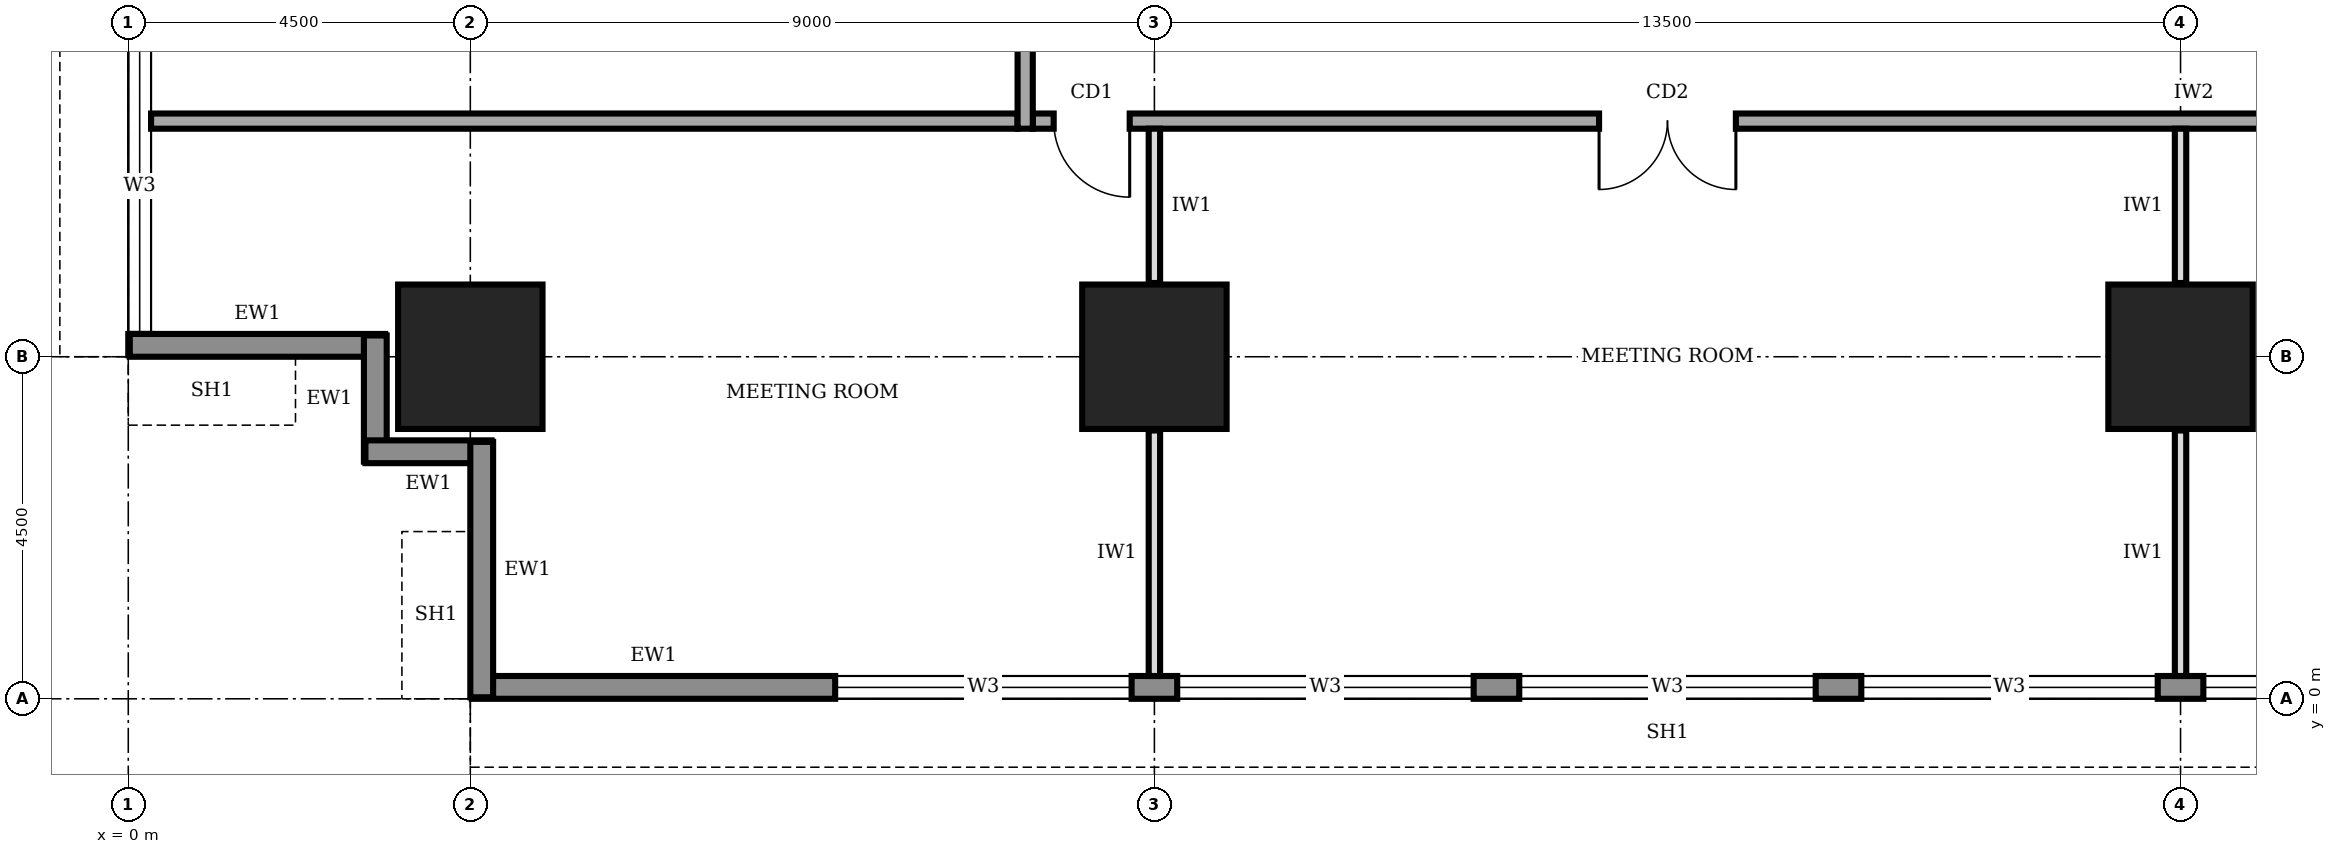
"""IFC4 building model, lengths in metres.
Left out: names, types, materials, properties, quantities, classifications, styles, units other than length and angle.
Written with IfcOpenShell. Run it as: python <this file> out.ifc"""

import sys

from ifc_helpers import new_model, si_unit, direction, frame, frame_2d, origin, origin_2d, place, context, subcontext, project, spatial, rectangle, extrude, element, fill, save


model = new_model("IFC4")
c1 = context("Model", 3, precision=1e-05, world=origin(), true_north=direction((0.0, 1.0)))
c2 = subcontext(c1, "Body", "Model", "MODEL_VIEW")
j1 = project(units=[si_unit("LENGTHUNIT", "METRE"), si_unit("PLANEANGLEUNIT", "RADIAN")], contexts=[c1])
p1 = place(None, origin())
s1 = spatial("IfcSite", under=j1, at=p1, CompositionType="ELEMENT")
p2 = place(p1, origin())
s2 = spatial("IfcBuilding", under=s1, at=p2, CompositionType="ELEMENT")
p3 = place(p2, frame((0.0, 0.0, 93.0)))
s3 = spatial("IfcBuildingStorey", under=s2, at=p3, CompositionType="ELEMENT", Elevation=93.0)
for number, where, z_axis, x_axis in (
    (1, (4.5, 4.5, 0.0), (0.0, 0.0, 1.0), (1.0, 0.0, 0.0)),
    (2, (13.5, 4.5, 0.0), (0.0, 0.0, 1.0), (1.0, 0.0, 0.0)),
    (3, (27.0, 4.5, 0.0), (0.0, 0.0, 1.0), (1.0, 0.0, 0.0)),
):
    element("IfcColumn", number, at=place(p3, frame(where, z_axis=z_axis, x_axis=x_axis)), inside=s3, PredefinedType="COLUMN", context=c2, shape_type="SweptSolid", body=[
        extrude(rectangle(XDim=1.9, YDim=1.9, at=origin_2d()), origin(), (0.0, 0.0, 1.0), 4.0),
    ])
p4 = place(p3, frame((4.52, 0.15, 0.0), z_axis=(0.0, 0.0, 1.0), x_axis=(1.0, 0.0, 0.0)))
e4 = element("IfcWall", 4, at=p4, inside=s3, PredefinedType="STANDARD", context=c2, shape_type="SweptSolid", body=[
    extrude(rectangle(XDim=31.46, YDim=0.3, at=frame_2d((15.73, 0.0))), origin(), (0.0, 0.0, 1.0), 3.75),
])
p5 = place(p4, frame((4.78, 0.0, 0.95)))
e5 = element("IfcOpeningElement", 5, at=p5, cuts=e4, PredefinedType="OPENING", context=c2, shape_type="SweptSolid", body=[
    extrude(rectangle(XDim=3.9, YDim=1.8, at=frame_2d((1.95, 0.9))), frame((0.0, 0.16, 0.0), z_axis=(0.0, -1.0, 0.0), x_axis=(1.0, 0.0, 0.0)), (0.0, 0.0, 1.0), 0.32),
])
p6 = place(p4, frame((9.28, 0.0, 0.95)))
e6 = element("IfcOpeningElement", 6, at=p6, cuts=e4, PredefinedType="OPENING", context=c2, shape_type="SweptSolid", body=[
    extrude(rectangle(XDim=3.9, YDim=1.8, at=frame_2d((1.95, 0.9))), frame((0.0, 0.16, 0.0), z_axis=(0.0, -1.0, 0.0), x_axis=(1.0, 0.0, 0.0)), (0.0, 0.0, 1.0), 0.32),
])
p7 = place(p4, frame((13.78, 0.0, 0.95)))
e7 = element("IfcOpeningElement", 7, at=p7, cuts=e4, PredefinedType="OPENING", context=c2, shape_type="SweptSolid", body=[
    extrude(rectangle(XDim=3.9, YDim=1.8, at=frame_2d((1.95, 0.9))), frame((0.0, 0.16, 0.0), z_axis=(0.0, -1.0, 0.0), x_axis=(1.0, 0.0, 0.0)), (0.0, 0.0, 1.0), 0.32),
])
p8 = place(p4, frame((18.28, 0.0, 0.95)))
e8 = element("IfcOpeningElement", 8, at=p8, cuts=e4, PredefinedType="OPENING", context=c2, shape_type="SweptSolid", body=[
    extrude(rectangle(XDim=3.9, YDim=1.8, at=frame_2d((1.95, 0.9))), frame((0.0, 0.16, 0.0), z_axis=(0.0, -1.0, 0.0), x_axis=(1.0, 0.0, 0.0)), (0.0, 0.0, 1.0), 0.32),
])
p9 = place(p4, frame((22.78, 0.0, 0.95)))
e9 = element("IfcOpeningElement", 9, at=p9, cuts=e4, PredefinedType="OPENING", context=c2, shape_type="SweptSolid", body=[
    extrude(rectangle(XDim=3.9, YDim=1.8, at=frame_2d((1.95, 0.9))), frame((0.0, 0.16, 0.0), z_axis=(0.0, -1.0, 0.0), x_axis=(1.0, 0.0, 0.0)), (0.0, 0.0, 1.0), 0.32),
])
p10 = place(p4, frame((27.28, 0.0, 0.95)))
e10 = element("IfcOpeningElement", 10, at=p10, cuts=e4, PredefinedType="OPENING", context=c2, shape_type="SweptSolid", body=[
    extrude(rectangle(XDim=3.9, YDim=1.8, at=frame_2d((1.95, 0.9))), frame((0.0, 0.16, 0.0), z_axis=(0.0, -1.0, 0.0), x_axis=(1.0, 0.0, 0.0)), (0.0, 0.0, 1.0), 0.32),
])
p11 = place(p3, frame((0.15, 35.98, 0.0), z_axis=(0.0, 0.0, 1.0), x_axis=(0.0, -1.0, 0.0)))
e11 = element("IfcWall", 11, at=p11, inside=s3, PredefinedType="STANDARD", context=c2, shape_type="SweptSolid", body=[
    extrude(rectangle(XDim=31.46, YDim=0.3, at=frame_2d((15.73, 0.0))), origin(), (0.0, 0.0, 1.0), 3.75),
])
p12 = place(p11, frame((27.28, 0.0, 0.95)))
e12 = element("IfcOpeningElement", 12, at=p12, cuts=e11, PredefinedType="OPENING", context=c2, shape_type="SweptSolid", body=[
    extrude(rectangle(XDim=3.9, YDim=1.8, at=frame_2d((1.95, 0.9))), frame((0.0, 0.16, 0.0), z_axis=(0.0, -1.0, 0.0), x_axis=(1.0, 0.0, 0.0)), (0.0, 0.0, 1.0), 0.32),
])
p13 = place(p11, frame((22.78, 0.0, 0.95)))
e13 = element("IfcOpeningElement", 13, at=p13, cuts=e11, PredefinedType="OPENING", context=c2, shape_type="SweptSolid", body=[
    extrude(rectangle(XDim=3.9, YDim=1.8, at=frame_2d((1.95, 0.9))), frame((0.0, 0.16, 0.0), z_axis=(0.0, -1.0, 0.0), x_axis=(1.0, 0.0, 0.0)), (0.0, 0.0, 1.0), 0.32),
])
p14 = place(p11, frame((18.28, 0.0, 0.95)))
e14 = element("IfcOpeningElement", 14, at=p14, cuts=e11, PredefinedType="OPENING", context=c2, shape_type="SweptSolid", body=[
    extrude(rectangle(XDim=3.9, YDim=1.8, at=frame_2d((1.95, 0.9))), frame((0.0, 0.16, 0.0), z_axis=(0.0, -1.0, 0.0), x_axis=(1.0, 0.0, 0.0)), (0.0, 0.0, 1.0), 0.32),
])
p15 = place(p11, frame((13.78, 0.0, 0.95)))
e15 = element("IfcOpeningElement", 15, at=p15, cuts=e11, PredefinedType="OPENING", context=c2, shape_type="SweptSolid", body=[
    extrude(rectangle(XDim=3.9, YDim=1.8, at=frame_2d((1.95, 0.9))), frame((0.0, 0.16, 0.0), z_axis=(0.0, -1.0, 0.0), x_axis=(1.0, 0.0, 0.0)), (0.0, 0.0, 1.0), 0.32),
])
p16 = place(p11, frame((9.28, 0.0, 0.95)))
e16 = element("IfcOpeningElement", 16, at=p16, cuts=e11, PredefinedType="OPENING", context=c2, shape_type="SweptSolid", body=[
    extrude(rectangle(XDim=3.9, YDim=1.8, at=frame_2d((1.95, 0.9))), frame((0.0, 0.16, 0.0), z_axis=(0.0, -1.0, 0.0), x_axis=(1.0, 0.0, 0.0)), (0.0, 0.0, 1.0), 0.32),
])
p17 = place(p11, frame((4.78, 0.0, 0.95)))
e17 = element("IfcOpeningElement", 17, at=p17, cuts=e11, PredefinedType="OPENING", context=c2, shape_type="SweptSolid", body=[
    extrude(rectangle(XDim=3.9, YDim=1.8, at=frame_2d((1.95, 0.9))), frame((0.0, 0.16, 0.0), z_axis=(0.0, -1.0, 0.0), x_axis=(1.0, 0.0, 0.0)), (0.0, 0.0, 1.0), 0.32),
])
p18 = place(p3, frame((0.02, 4.65, 0.0), z_axis=(0.0, 0.0, 1.0), x_axis=(1.0, 0.0, 0.0)))
e18 = element("IfcWall", 18, at=p18, inside=s3, PredefinedType="STANDARD", context=c2, shape_type="SweptSolid", body=[
    extrude(rectangle(XDim=3.36, YDim=0.3, at=frame_2d((1.68, 0.0))), origin(), (0.0, 0.0, 1.0), 2.85),
])
for number, where, z_axis, x_axis in (
    (19, (3.25, 4.78, 0.0), (0.0, 0.0, 1.0), (0.0, -1.0, 0.0)),
    (20, (3.12, 3.25, 0.0), (0.0, 0.0, 1.0), (1.0, 0.0, 0.0)),
):
    element("IfcWall", number, at=place(p3, frame(where, z_axis=z_axis, x_axis=x_axis)), inside=s3, PredefinedType="STANDARD", context=c2, shape_type="SweptSolid", body=[
        extrude(rectangle(XDim=1.66, YDim=0.3, at=frame_2d((0.83, 0.0))), origin(), (0.0, 0.0, 1.0), 3.75),
    ])
p19 = place(p3, frame((4.65, 3.38, 0.0), z_axis=(0.0, 0.0, 1.0), x_axis=(0.0, -1.0, 0.0)))
e21 = element("IfcWall", 21, at=p19, inside=s3, PredefinedType="STANDARD", context=c2, shape_type="SweptSolid", body=[
    extrude(rectangle(XDim=3.36, YDim=0.3, at=frame_2d((1.68, 0.0))), origin(), (0.0, 0.0, 1.0), 2.85),
])
p20 = place(p3, frame((11.9, 7.6, 0.0), z_axis=(0.0, 0.0, 1.0), x_axis=(1.0, 0.0, 0.0)))
e22 = element("IfcWall", 22, at=p20, inside=s3, PredefinedType="SOLIDWALL", context=c2, shape_type="SweptSolid", body=[
    extrude(rectangle(XDim=28.3, YDim=0.2, at=frame_2d((14.15, 0.0))), origin(), (0.0, 0.0, 1.0), 3.75),
])
p21 = place(p20, frame((0.275, 0.0, 0.0)))
e23 = element("IfcOpeningElement", 23, at=p21, cuts=e22, PredefinedType="OPENING", context=c2, shape_type="SweptSolid", body=[
    extrude(rectangle(XDim=1.0, YDim=2.1, at=frame_2d((0.5, 1.05))), frame((0.0, 0.11, 0.0), z_axis=(0.0, -1.0, 0.0), x_axis=(1.0, 0.0, 0.0)), (0.0, 0.0, 1.0), 0.22),
])
p22 = place(p20, frame((7.45, 0.0, 0.0)))
e24 = element("IfcOpeningElement", 24, at=p22, cuts=e22, PredefinedType="OPENING", context=c2, shape_type="SweptSolid", body=[
    extrude(rectangle(XDim=1.8, YDim=2.1, at=frame_2d((0.9, 1.05))), frame((0.0, 0.11, 0.0), z_axis=(0.0, -1.0, 0.0), x_axis=(1.0, 0.0, 0.0)), (0.0, 0.0, 1.0), 0.22),
])
p23 = place(p20, frame((21.3, 0.0, 0.0)))
e25 = element("IfcOpeningElement", 25, at=p23, cuts=e22, PredefinedType="OPENING", context=c2, shape_type="SweptSolid", body=[
    extrude(rectangle(XDim=1.0, YDim=2.1, at=frame_2d((0.5, 1.05))), frame((0.0, 0.11, 0.0), z_axis=(0.0, -1.0, 0.0), x_axis=(1.0, 0.0, 0.0)), (0.0, 0.0, 1.0), 0.22),
])
p24 = place(p3, frame((11.8, 32.8, 0.0), z_axis=(0.0, 0.0, 1.0), x_axis=(0.0, -1.0, 0.0)))
e26 = element("IfcWall", 26, at=p24, inside=s3, PredefinedType="SOLIDWALL", context=c2, shape_type="SweptSolid", body=[
    extrude(rectangle(XDim=25.3, YDim=0.2, at=frame_2d((12.65, 0.0))), origin(), (0.0, 0.0, 1.0), 3.75),
])
p25 = place(p24, frame((21.8, 0.0, 0.0)))
e27 = element("IfcOpeningElement", 27, at=p25, cuts=e26, PredefinedType="OPENING", context=c2, shape_type="SweptSolid", body=[
    extrude(rectangle(XDim=1.0, YDim=2.1, at=frame_2d((0.5, 1.05))), frame((0.0, 0.11, 0.0), z_axis=(0.0, -1.0, 0.0), x_axis=(1.0, 0.0, 0.0)), (0.0, 0.0, 1.0), 0.22),
])
p26 = place(p24, frame((17.7, 0.0, 0.0)))
e28 = element("IfcOpeningElement", 28, at=p26, cuts=e26, PredefinedType="OPENING", context=c2, shape_type="SweptSolid", body=[
    extrude(rectangle(XDim=1.0, YDim=2.1, at=frame_2d((0.5, 1.05))), frame((0.0, 0.11, 0.0), z_axis=(0.0, -1.0, 0.0), x_axis=(1.0, 0.0, 0.0)), (0.0, 0.0, 1.0), 0.22),
])
p27 = place(p24, frame((14.7, 0.0, 0.0)))
e29 = element("IfcOpeningElement", 29, at=p27, cuts=e26, PredefinedType="OPENING", context=c2, shape_type="SweptSolid", body=[
    extrude(rectangle(XDim=0.9, YDim=2.1, at=frame_2d((0.45, 1.05))), frame((0.0, 0.11, 0.0), z_axis=(0.0, -1.0, 0.0), x_axis=(1.0, 0.0, 0.0)), (0.0, 0.0, 1.0), 0.22),
])
p28 = place(p24, frame((11.65, 0.0, 0.0)))
e30 = element("IfcOpeningElement", 30, at=p28, cuts=e26, PredefinedType="OPENING", context=c2, shape_type="SweptSolid", body=[
    extrude(rectangle(XDim=0.9, YDim=2.1, at=frame_2d((0.45, 1.05))), frame((0.0, 0.11, 0.0), z_axis=(0.0, -1.0, 0.0), x_axis=(1.0, 0.0, 0.0)), (0.0, 0.0, 1.0), 0.22),
])
p29 = place(p24, frame((6.95, 0.0, 0.0)))
e31 = element("IfcOpeningElement", 31, at=p29, cuts=e26, PredefinedType="OPENING", context=c2, shape_type="SweptSolid", body=[
    extrude(rectangle(XDim=0.9, YDim=2.1, at=frame_2d((0.45, 1.05))), frame((0.0, 0.11, 0.0), z_axis=(0.0, -1.0, 0.0), x_axis=(1.0, 0.0, 0.0)), (0.0, 0.0, 1.0), 0.22),
])
p30 = place(p24, frame((9.5, 0.0, 0.0)))
e32 = element("IfcOpeningElement", 32, at=p30, cuts=e26, PredefinedType="OPENING", context=c2, shape_type="SweptSolid", body=[
    extrude(rectangle(XDim=1.0, YDim=2.1, at=frame_2d((0.5, 1.05))), frame((0.0, 0.11, 0.0), z_axis=(0.0, -1.0, 0.0), x_axis=(1.0, 0.0, 0.0)), (0.0, 0.0, 1.0), 0.22),
])
p31 = place(p24, frame((2.3, 0.0, 0.0)))
e33 = element("IfcOpeningElement", 33, at=p31, cuts=e26, PredefinedType="OPENING", context=c2, shape_type="SweptSolid", body=[
    extrude(rectangle(XDim=1.0, YDim=2.1, at=frame_2d((0.5, 1.05))), frame((0.0, 0.11, 0.0), z_axis=(0.0, -1.0, 0.0), x_axis=(1.0, 0.0, 0.0)), (0.0, 0.0, 1.0), 0.22),
])
p32 = place(p3, frame((0.3, 7.6, 0.0), z_axis=(0.0, 0.0, 1.0), x_axis=(1.0, 0.0, 0.0)))
e34 = element("IfcWall", 34, at=p32, inside=s3, PredefinedType="SOLIDWALL", context=c2, shape_type="SweptSolid", body=[
    extrude(rectangle(XDim=11.4, YDim=0.2, at=frame_2d((5.7, 0.0))), origin(), (0.0, 0.0, 1.0), 3.75),
])
p33 = place(p3, frame((13.5, 0.3, 0.0), z_axis=(0.0, 0.0, 1.0), x_axis=(0.0, 1.0, 0.0)))
e35 = element("IfcWall", 35, at=p33, inside=s3, PredefinedType="PARTITIONING", context=c2, shape_type="SweptSolid", body=[
    extrude(rectangle(XDim=3.23, YDim=0.15, at=frame_2d((1.615, 0.0))), origin(), (0.0, 0.0, 1.0), 2.85),
])
p34 = place(p3, frame((13.5, 5.47, 0.0), z_axis=(0.0, 0.0, 1.0), x_axis=(0.0, 1.0, 0.0)))
e36 = element("IfcWall", 36, at=p34, inside=s3, PredefinedType="PARTITIONING", context=c2, shape_type="SweptSolid", body=[
    extrude(rectangle(XDim=2.03, YDim=0.15, at=frame_2d((1.015, 0.0))), origin(), (0.0, 0.0, 1.0), 2.85),
])
p35 = place(p3, frame((27.0, 0.3, 0.0), z_axis=(0.0, 0.0, 1.0), x_axis=(0.0, 1.0, 0.0)))
e37 = element("IfcWall", 37, at=p35, inside=s3, PredefinedType="PARTITIONING", context=c2, shape_type="SweptSolid", body=[
    extrude(rectangle(XDim=3.23, YDim=0.15, at=frame_2d((1.615, 0.0))), origin(), (0.0, 0.0, 1.0), 2.85),
])
p36 = place(p3, frame((27.0, 5.47, 0.0), z_axis=(0.0, 0.0, 1.0), x_axis=(0.0, 1.0, 0.0)))
e38 = element("IfcWall", 38, at=p36, inside=s3, PredefinedType="PARTITIONING", context=c2, shape_type="SweptSolid", body=[
    extrude(rectangle(XDim=2.03, YDim=0.15, at=frame_2d((1.015, 0.0))), origin(), (0.0, 0.0, 1.0), 2.85),
])
p37 = place(p5, origin())
e39 = element("IfcWindow", 39, at=p37, inside=s3, PartitioningType="SINGLE_PANEL", PredefinedType="WINDOW", context=c2, shape_type="SweptSolid", body=[
    extrude(rectangle(XDim=3.9, YDim=1.8, at=frame_2d((1.95, 0.9))), frame((0.0, 0.03, 0.0), z_axis=(0.0, -1.0, 0.0), x_axis=(1.0, 0.0, 0.0)), (0.0, 0.0, 1.0), 0.06),
])
fill(e5, e39)
p38 = place(p6, origin())
e40 = element("IfcWindow", 40, at=p38, inside=s3, PartitioningType="SINGLE_PANEL", PredefinedType="WINDOW", context=c2, shape_type="SweptSolid", body=[
    extrude(rectangle(XDim=3.9, YDim=1.8, at=frame_2d((1.95, 0.9))), frame((0.0, 0.03, 0.0), z_axis=(0.0, -1.0, 0.0), x_axis=(1.0, 0.0, 0.0)), (0.0, 0.0, 1.0), 0.06),
])
fill(e6, e40)
p39 = place(p7, origin())
e41 = element("IfcWindow", 41, at=p39, inside=s3, PartitioningType="SINGLE_PANEL", PredefinedType="WINDOW", context=c2, shape_type="SweptSolid", body=[
    extrude(rectangle(XDim=3.9, YDim=1.8, at=frame_2d((1.95, 0.9))), frame((0.0, 0.03, 0.0), z_axis=(0.0, -1.0, 0.0), x_axis=(1.0, 0.0, 0.0)), (0.0, 0.0, 1.0), 0.06),
])
fill(e7, e41)
p40 = place(p8, origin())
e42 = element("IfcWindow", 42, at=p40, inside=s3, PartitioningType="SINGLE_PANEL", PredefinedType="WINDOW", context=c2, shape_type="SweptSolid", body=[
    extrude(rectangle(XDim=3.9, YDim=1.8, at=frame_2d((1.95, 0.9))), frame((0.0, 0.03, 0.0), z_axis=(0.0, -1.0, 0.0), x_axis=(1.0, 0.0, 0.0)), (0.0, 0.0, 1.0), 0.06),
])
fill(e8, e42)
p41 = place(p9, origin())
e43 = element("IfcWindow", 43, at=p41, inside=s3, PartitioningType="SINGLE_PANEL", PredefinedType="WINDOW", context=c2, shape_type="SweptSolid", body=[
    extrude(rectangle(XDim=3.9, YDim=1.8, at=frame_2d((1.95, 0.9))), frame((0.0, 0.03, 0.0), z_axis=(0.0, -1.0, 0.0), x_axis=(1.0, 0.0, 0.0)), (0.0, 0.0, 1.0), 0.06),
])
fill(e9, e43)
p42 = place(p12, origin())
e44 = element("IfcWindow", 44, at=p42, inside=s3, PartitioningType="SINGLE_PANEL", PredefinedType="WINDOW", context=c2, shape_type="SweptSolid", body=[
    extrude(rectangle(XDim=3.9, YDim=1.8, at=frame_2d((1.95, 0.9))), frame((0.0, 0.03, 0.0), z_axis=(0.0, -1.0, 0.0), x_axis=(1.0, 0.0, 0.0)), (0.0, 0.0, 1.0), 0.06),
])
fill(e12, e44)
p43 = place(p21, frame((1.0, 0.0, 0.0), z_axis=(0.0, 0.0, 1.0), x_axis=(-1.0, 0.0, 0.0)))
e45 = element("IfcDoor", 45, at=p43, inside=s3, OperationType="SINGLE_SWING_LEFT", PredefinedType="DOOR", context=c2, shape_type="SweptSolid", body=[
    extrude(rectangle(XDim=1.0, YDim=2.1, at=frame_2d((0.5, 1.05))), frame((0.0, 0.025, 0.0), z_axis=(0.0, -1.0, 0.0), x_axis=(1.0, 0.0, 0.0)), (0.0, 0.0, 1.0), 0.05),
])
fill(e23, e45)
p44 = place(p22, frame((1.8, 0.0, 0.0), z_axis=(0.0, 0.0, 1.0), x_axis=(-1.0, 0.0, 0.0)))
e46 = element("IfcDoor", 46, at=p44, inside=s3, OperationType="DOUBLE_DOOR_SINGLE_SWING", PredefinedType="DOOR", context=c2, shape_type="SweptSolid", body=[
    extrude(rectangle(XDim=1.8, YDim=2.1, at=frame_2d((0.9, 1.05))), frame((0.0, 0.025, 0.0), z_axis=(0.0, -1.0, 0.0), x_axis=(1.0, 0.0, 0.0)), (0.0, 0.0, 1.0), 0.05),
])
fill(e24, e46)
save(model, sys.argv[1])
